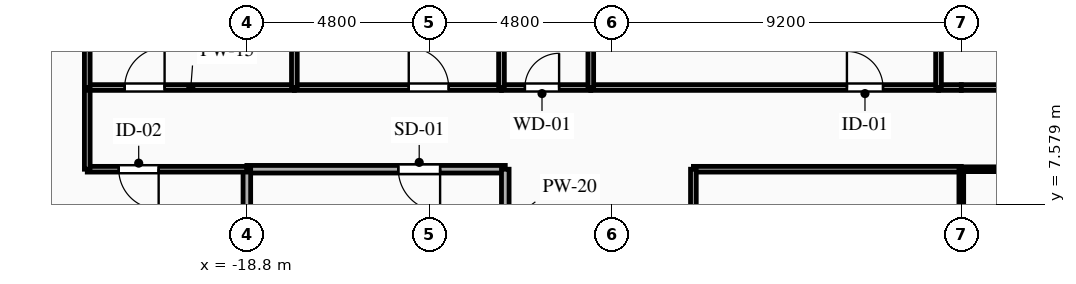
"""IFC4 building model, lengths in metres.
Left out: names, types, materials, properties, quantities, classifications, styles, units other than length and angle.
Written with IfcOpenShell. Run it as: python <this file> out.ifc"""

import sys

from ifc_helpers import new_model, si_unit, direction, frame, frame_2d, origin, place, context, subcontext, project, spatial, rectangle, extrude, element, fill, save


model = new_model("IFC4")
c1 = context("Model", 3, precision=1e-05, world=origin(), true_north=direction((0.0, 1.0)))
c2 = subcontext(c1, "Body", "Model", "MODEL_VIEW")
j1 = project(units=[si_unit("LENGTHUNIT", "METRE"), si_unit("PLANEANGLEUNIT", "RADIAN")], contexts=[c1])
p1 = place(None, origin())
s1 = spatial("IfcSite", under=j1, at=p1, CompositionType="ELEMENT")
p2 = place(p1, origin())
s2 = spatial("IfcBuilding", under=s1, at=p2, CompositionType="ELEMENT")
p3 = place(p2, frame((0.0, 0.0, 67.2)))
s3 = spatial("IfcBuildingStorey", under=s2, at=p3, CompositionType="ELEMENT", Elevation=67.2)
p4 = place(p3, frame((-12.0, 8.5, 0.0), z_axis=(0.0, 0.0, 1.0), x_axis=(-1.0, 0.0, 0.0)))
e1 = element("IfcWall", 1, at=p4, inside=s3, PredefinedType="PARTITIONING", context=c2, shape_type="SweptSolid", body=[
    extrude(rectangle(XDim=6.8, YDim=0.2, at=frame_2d((3.4, 0.0))), origin(), (0.0, 0.0, 1.0), 3.035),
])
p5 = place(p4, frame((1.715, 0.0, 0.0)))
e2 = element("IfcOpeningElement", 2, at=p5, cuts=e1, PredefinedType="OPENING", context=c2, shape_type="SweptSolid", body=[
    extrude(rectangle(XDim=1.1, YDim=2.15, at=frame_2d((0.55, 1.075))), frame((0.0, 0.11, 0.0), z_axis=(0.0, -1.0, 0.0), x_axis=(1.0, 0.0, 0.0)), (0.0, 0.0, 1.0), 0.22),
])
p6 = place(p3, frame((-12.0, 5.6, 0.0), z_axis=(0.0, 0.0, 1.0), x_axis=(0.0, 1.0, 0.0)))
e3 = element("IfcWall", 3, at=p6, inside=s3, PredefinedType="PARTITIONING", context=c2, shape_type="SweptSolid", body=[
    extrude(rectangle(XDim=2.9, YDim=0.2, at=frame_2d((1.45, 0.0))), origin(), (0.0, 0.0, 1.0), 3.035),
])
p7 = place(p3, frame((-18.8, 8.5, 0.0), z_axis=(0.0, 0.0, 1.0), x_axis=(0.0, -1.0, 0.0)))
e4 = element("IfcWall", 4, at=p7, inside=s3, PredefinedType="PARTITIONING", context=c2, shape_type="SweptSolid", body=[
    extrude(rectangle(XDim=2.173, YDim=0.2, at=frame_2d((1.086, 0.0))), origin(), (0.0, 0.0, 1.0), 2.52),
])
p8 = place(p3, frame((-18.8, 8.5, 0.0), z_axis=(0.0, 0.0, 1.0), x_axis=(-1.0, 0.0, 0.0)))
e5 = element("IfcWall", 5, at=p8, inside=s3, PredefinedType="PARTITIONING", context=c2, shape_type="SweptSolid", body=[
    extrude(rectangle(XDim=4.2, YDim=0.15, at=frame_2d((2.1, 0.0))), origin(), (0.0, 0.0, 1.0), 3.035),
])
p9 = place(p8, frame((2.321, 0.0, 0.0)))
e6 = element("IfcOpeningElement", 6, at=p9, cuts=e5, PredefinedType="OPENING", context=c2, shape_type="SweptSolid", body=[
    extrude(rectangle(XDim=1.05, YDim=2.15, at=frame_2d((0.525, 1.075))), frame((0.0, 0.085, 0.0), z_axis=(0.0, -1.0, 0.0), x_axis=(1.0, 0.0, 0.0)), (0.0, 0.0, 1.0), 0.17),
])
p10 = place(p3, frame((-23.0, 8.5, 0.0), z_axis=(0.0, 0.0, 1.0), x_axis=(0.0, 1.0, 0.0)))
e7 = element("IfcWall", 7, at=p10, inside=s3, PredefinedType="PARTITIONING", context=c2, shape_type="SweptSolid", body=[
    extrude(rectangle(XDim=2.15, YDim=0.15, at=frame_2d((1.075, 0.0))), origin(), (0.0, 0.0, 1.0), 3.035),
])
p11 = place(p3, frame((-23.0, 10.65, 0.0), z_axis=(0.0, 0.0, 1.0), x_axis=(1.0, 0.0, 0.0)))
e8 = element("IfcWall", 8, at=p11, inside=s3, PredefinedType="PARTITIONING", context=c2, shape_type="SweptSolid", body=[
    extrude(rectangle(XDim=5.45, YDim=0.15, at=frame_2d((2.725, 0.0))), origin(), (0.0, 0.0, 1.0), 3.035),
])
p12 = place(p11, frame((0.985, 0.0, 0.0)))
e9 = element("IfcOpeningElement", 9, at=p12, cuts=e8, PredefinedType="OPENING", context=c2, shape_type="SweptSolid", body=[
    extrude(rectangle(XDim=1.05, YDim=2.15, at=frame_2d((0.525, 1.075))), frame((0.0, 0.085, 0.0), z_axis=(0.0, -1.0, 0.0), x_axis=(1.0, 0.0, 0.0)), (0.0, 0.0, 1.0), 0.17),
])
p13 = place(p3, frame((-17.55, 10.65, 0.0), z_axis=(0.0, 0.0, 1.0), x_axis=(1.0, 0.0, 0.0)))
e10 = element("IfcWall", 10, at=p13, inside=s3, PredefinedType="PARTITIONING", context=c2, shape_type="SweptSolid", body=[
    extrude(rectangle(XDim=5.45, YDim=0.15, at=frame_2d((2.725, 0.0))), origin(), (0.0, 0.0, 1.0), 3.035),
])
p14 = place(p13, frame((3.01, 0.0, 0.0)))
e11 = element("IfcOpeningElement", 11, at=p14, cuts=e10, PredefinedType="OPENING", context=c2, shape_type="SweptSolid", body=[
    extrude(rectangle(XDim=1.05, YDim=2.15, at=frame_2d((0.525, 1.075))), frame((0.0, 0.085, 0.0), z_axis=(0.0, -1.0, 0.0), x_axis=(1.0, 0.0, 0.0)), (0.0, 0.0, 1.0), 0.17),
])
p15 = place(p3, frame((-12.1, 10.65, 0.0), z_axis=(0.0, 0.0, 1.0), x_axis=(1.0, 0.0, 0.0)))
e12 = element("IfcWall", 12, at=p15, inside=s3, PredefinedType="PLUMBINGWALL", context=c2, shape_type="SweptSolid", body=[
    extrude(rectangle(XDim=2.35, YDim=0.15, at=frame_2d((1.175, 0.0))), origin(), (0.0, 0.0, 1.0), 3.035),
])
p16 = place(p15, frame((0.616, 0.0, 0.0)))
e13 = element("IfcOpeningElement", 13, at=p16, cuts=e12, PredefinedType="OPENING", context=c2, shape_type="SweptSolid", body=[
    extrude(rectangle(XDim=0.9, YDim=2.1, at=frame_2d((0.45, 1.05))), frame((0.0, 0.085, 0.0), z_axis=(0.0, -1.0, 0.0), x_axis=(1.0, 0.0, 0.0)), (0.0, 0.0, 1.0), 0.17),
])
p17 = place(p3, frame((-9.75, 10.65, 0.0), z_axis=(0.0, 0.0, 1.0), x_axis=(1.0, 0.0, 0.0)))
e14 = element("IfcWall", 14, at=p17, inside=s3, PredefinedType="PARTITIONING", context=c2, shape_type="SweptSolid", body=[
    extrude(rectangle(XDim=9.15, YDim=0.15, at=frame_2d((4.575, 0.0))), origin(), (0.0, 0.0, 1.0), 3.035),
])
p18 = place(p17, frame((6.74, 0.0, 0.0)))
e15 = element("IfcOpeningElement", 15, at=p18, cuts=e14, PredefinedType="OPENING", context=c2, shape_type="SweptSolid", body=[
    extrude(rectangle(XDim=0.95, YDim=2.1, at=frame_2d((0.475, 1.05))), frame((0.0, 0.085, 0.0), z_axis=(0.0, -1.0, 0.0), x_axis=(1.0, 0.0, 0.0)), (0.0, 0.0, 1.0), 0.17),
])
p19 = place(p3, frame((-0.6, 10.65, 0.0), z_axis=(0.0, 0.0, 1.0), x_axis=(1.0, 0.0, 0.0)))
e16 = element("IfcWall", 16, at=p19, inside=s3, PredefinedType="PLUMBINGWALL", context=c2, shape_type="SweptSolid", body=[
    extrude(rectangle(XDim=0.6, YDim=0.15, at=frame_2d((0.3, 0.0))), origin(), (0.0, 0.0, 1.0), 3.035),
])
p20 = place(p3, frame((0.0, 8.5, 0.0), z_axis=(0.0, 0.0, 1.0), x_axis=(-1.0, 0.0, 0.0)))
e17 = element("IfcWall", 17, at=p20, inside=s3, PredefinedType="PARTITIONING", context=c2, shape_type="SweptSolid", body=[
    extrude(rectangle(XDim=7.05, YDim=0.15, at=frame_2d((3.525, 0.0))), origin(), (0.0, 0.0, 1.0), 3.035),
])
p21 = place(p3, frame((0.0, 10.65, 0.0), z_axis=(0.0, 0.0, 1.0), x_axis=(1.0, 0.0, 0.0)))
e18 = element("IfcWall", 18, at=p21, inside=s3, PredefinedType="PLUMBINGWALL", context=c2, shape_type="SweptSolid", body=[
    extrude(rectangle(XDim=1.85, YDim=0.15, at=frame_2d((0.925, 0.0))), origin(), (0.0, 0.0, 1.0), 3.035),
])
p22 = place(p3, frame((7.05, 8.5, 0.0), z_axis=(0.0, 0.0, 1.0), x_axis=(-1.0, 0.0, 0.0)))
e19 = element("IfcWall", 19, at=p22, inside=s3, PredefinedType="PARTITIONING", context=c2, shape_type="SweptSolid", body=[
    extrude(rectangle(XDim=7.05, YDim=0.125, at=frame_2d((3.525, 0.0))), origin(), (0.0, 0.0, 1.0), 3.035),
])
p23 = place(p3, frame((-7.05, 8.5, 0.0), z_axis=(0.0, 0.0, 1.0), x_axis=(0.0, -1.0, 0.0)))
e20 = element("IfcWall", 20, at=p23, inside=s3, PredefinedType="PARTITIONING", context=c2, shape_type="SweptSolid", body=[
    extrude(rectangle(XDim=14.1, YDim=0.15, at=frame_2d((7.05, 0.0))), origin(), (0.0, 0.0, 1.0), 3.035),
])
p24 = place(p23, frame((8.074, 0.0, 0.0)))
e21 = element("IfcOpeningElement", 21, at=p24, cuts=e20, PredefinedType="OPENING", context=c2, shape_type="SweptSolid", body=[
    extrude(rectangle(XDim=0.95, YDim=2.1, at=frame_2d((0.475, 1.05))), frame((0.0, 0.085, 0.0), z_axis=(0.0, -1.0, 0.0), x_axis=(1.0, 0.0, 0.0)), (0.0, 0.0, 1.0), 0.17),
])
for number, where, z_axis, x_axis in (
    (22, (-23.0, 19.4, 0.0), (0.0, 0.0, 1.0), (0.0, -1.0, 0.0)),
    (23, (-17.55, 19.4, 0.0), (0.0, 0.0, 1.0), (0.0, -1.0, 0.0)),
):
    element("IfcWall", number, at=place(p3, frame(where, z_axis=z_axis, x_axis=x_axis)), inside=s3, PredefinedType="PARTITIONING", context=c2, shape_type="SweptSolid", body=[
        extrude(rectangle(XDim=8.75, YDim=0.15, at=frame_2d((4.375, 0.0))), origin(), (0.0, 0.0, 1.0), 3.035),
    ])
for number, where, z_axis, x_axis in (
    (24, (-12.1, 19.4, 0.0), (0.0, 0.0, 1.0), (0.0, -1.0, 0.0)),
    (25, (-9.75, 19.4, 0.0), (0.0, 0.0, 1.0), (0.0, -1.0, 0.0)),
):
    element("IfcWall", number, at=place(p3, frame(where, z_axis=z_axis, x_axis=x_axis)), inside=s3, PredefinedType="PLUMBINGWALL", context=c2, shape_type="SweptSolid", body=[
        extrude(rectangle(XDim=8.75, YDim=0.15, at=frame_2d((4.375, 0.0))), origin(), (0.0, 0.0, 1.0), 3.035),
    ])
p25 = place(p3, frame((-0.6, 12.8, 0.0), z_axis=(0.0, 0.0, 1.0), x_axis=(0.0, -1.0, 0.0)))
e26 = element("IfcWall", 26, at=p25, inside=s3, PredefinedType="PLUMBINGWALL", context=c2, shape_type="SweptSolid", body=[
    extrude(rectangle(XDim=2.15, YDim=0.15, at=frame_2d((1.075, 0.0))), origin(), (0.0, 0.0, 1.0), 3.035),
])
p26 = place(p3, frame((0.0, 8.5, 0.0), z_axis=(0.0, 0.0, 1.0), x_axis=(0.0, -1.0, 0.0)))
e27 = element("IfcWall", 27, at=p26, inside=s3, PredefinedType="PARTITIONING", context=c2, shape_type="SweptSolid", body=[
    extrude(rectangle(XDim=14.1, YDim=0.125, at=frame_2d((7.05, 0.0))), origin(), (0.0, 0.0, 1.0), 3.035),
])
p27 = place(p5, origin())
e28 = element("IfcDoor", 28, at=p27, inside=s3, OperationType="SINGLE_SWING_LEFT", PredefinedType="DOOR", context=c2, shape_type="SweptSolid", body=[
    extrude(rectangle(XDim=1.1, YDim=2.15, at=frame_2d((0.55, 1.075))), frame((0.0, 0.025, 0.0), z_axis=(0.0, -1.0, 0.0), x_axis=(1.0, 0.0, 0.0)), (0.0, 0.0, 1.0), 0.05),
])
fill(e2, e28)
p28 = place(p9, origin())
e29 = element("IfcDoor", 29, at=p28, inside=s3, OperationType="SINGLE_SWING_LEFT", PredefinedType="DOOR", context=c2, shape_type="SweptSolid", body=[
    extrude(rectangle(XDim=1.05, YDim=2.15, at=frame_2d((0.525, 1.075))), frame((0.0, 0.025, 0.0), z_axis=(0.0, -1.0, 0.0), x_axis=(1.0, 0.0, 0.0)), (0.0, 0.0, 1.0), 0.05),
])
fill(e6, e29)
p29 = place(p12, origin())
e30 = element("IfcDoor", 30, at=p29, inside=s3, OperationType="SINGLE_SWING_RIGHT", PredefinedType="DOOR", context=c2, shape_type="SweptSolid", body=[
    extrude(rectangle(XDim=1.05, YDim=2.15, at=frame_2d((0.525, 1.075))), frame((0.0, 0.025, 0.0), z_axis=(0.0, -1.0, 0.0), x_axis=(1.0, 0.0, 0.0)), (0.0, 0.0, 1.0), 0.05),
])
fill(e9, e30)
p30 = place(p14, origin())
e31 = element("IfcDoor", 31, at=p30, inside=s3, OperationType="SINGLE_SWING_LEFT", PredefinedType="DOOR", context=c2, shape_type="SweptSolid", body=[
    extrude(rectangle(XDim=1.05, YDim=2.15, at=frame_2d((0.525, 1.075))), frame((0.0, 0.025, 0.0), z_axis=(0.0, -1.0, 0.0), x_axis=(1.0, 0.0, 0.0)), (0.0, 0.0, 1.0), 0.05),
])
fill(e11, e31)
p31 = place(p16, origin())
e32 = element("IfcDoor", 32, at=p31, inside=s3, OperationType="SINGLE_SWING_RIGHT", PredefinedType="DOOR", context=c2, shape_type="SweptSolid", body=[
    extrude(rectangle(XDim=0.9, YDim=2.1, at=frame_2d((0.45, 1.05))), frame((0.0, 0.025, 0.0), z_axis=(0.0, -1.0, 0.0), x_axis=(1.0, 0.0, 0.0)), (0.0, 0.0, 1.0), 0.05),
])
fill(e13, e32)
p32 = place(p18, origin())
e33 = element("IfcDoor", 33, at=p32, inside=s3, OperationType="SINGLE_SWING_LEFT", PredefinedType="DOOR", context=c2, shape_type="SweptSolid", body=[
    extrude(rectangle(XDim=0.95, YDim=2.1, at=frame_2d((0.475, 1.05))), frame((0.0, 0.025, 0.0), z_axis=(0.0, -1.0, 0.0), x_axis=(1.0, 0.0, 0.0)), (0.0, 0.0, 1.0), 0.05),
])
fill(e15, e33)
save(model, sys.argv[1])
